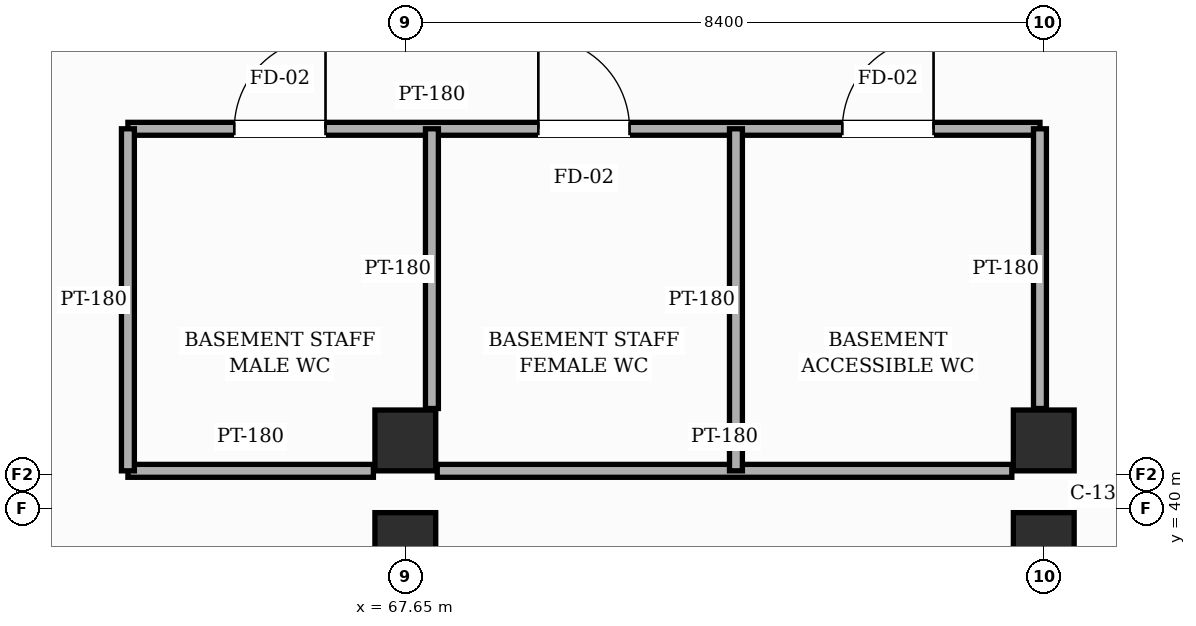
"""IFC4 building model, lengths in metres.
Left out: names, types, materials, properties, quantities, classifications, styles, units other than length and angle.
Written with IfcOpenShell. Run it as: python <this file> out.ifc"""

import sys

from ifc_helpers import new_model, si_unit, direction, frame, frame_2d, origin, origin_2d, place, context, subcontext, project, spatial, rectangle, hollow_rectangle, extrude, element, fill, save


model = new_model("IFC4")
c1 = context("Model", 3, precision=1e-05, world=origin(), true_north=direction((0.0, 1.0)))
c2 = subcontext(c1, "Body", "Model", "MODEL_VIEW")
j1 = project(units=[si_unit("LENGTHUNIT", "METRE"), si_unit("PLANEANGLEUNIT", "RADIAN")], contexts=[c1])
p1 = place(None, origin())
s1 = spatial("IfcSite", under=j1, at=p1, CompositionType="ELEMENT")
p2 = place(p1, origin())
s2 = spatial("IfcBuilding", under=s1, at=p2, CompositionType="ELEMENT")
p3 = place(p2, frame((0.0, 0.0, -5.4)))
s3 = spatial("IfcBuildingStorey", under=s2, at=p3, CompositionType="ELEMENT", Elevation=-5.4)
p4 = place(p3, frame((67.65, 39.55, 0.0), z_axis=(0.0, 0.0, 1.0), x_axis=(1.0, 0.0, 0.0)))
e1 = element("IfcColumn", 1, at=p4, inside=s3, PredefinedType="COLUMN", context=c2, shape_type="SweptSolid", body=[
    extrude(rectangle(XDim=0.8, YDim=0.8, at=origin_2d()), origin(), (0.0, 0.0, 1.0), 5.12),
])
p5 = place(p3, frame((67.65, 40.9, 0.0), z_axis=(0.0, 0.0, 1.0), x_axis=(1.0, 0.0, 0.0)))
e2 = element("IfcColumn", 2, at=p5, inside=s3, PredefinedType="COLUMN", context=c2, shape_type="SweptSolid", body=[
    extrude(hollow_rectangle(XDim=0.8, YDim=0.8, WallThickness=0.032, InnerFilletRadius=0.032, OuterFilletRadius=0.064, at=origin_2d()), origin(), (0.0, 0.0, 1.0), 5.4),
])
p6 = place(p3, frame((76.05, 39.55, 0.0), z_axis=(0.0, 0.0, 1.0), x_axis=(1.0, 0.0, 0.0)))
e3 = element("IfcColumn", 3, at=p6, inside=s3, PredefinedType="COLUMN", context=c2, shape_type="SweptSolid", body=[
    extrude(rectangle(XDim=0.8, YDim=0.8, at=origin_2d()), origin(), (0.0, 0.0, 1.0), 5.12),
])
p7 = place(p3, frame((76.05, 40.9, 0.0), z_axis=(0.0, 0.0, 1.0), x_axis=(1.0, 0.0, 0.0)))
e4 = element("IfcColumn", 4, at=p7, inside=s3, PredefinedType="COLUMN", context=c2, shape_type="SweptSolid", body=[
    extrude(hollow_rectangle(XDim=0.8, YDim=0.8, WallThickness=0.032, InnerFilletRadius=0.032, OuterFilletRadius=0.064, at=origin_2d()), origin(), (0.0, 0.0, 1.0), 5.4),
])
p8 = place(p3, frame((64.0, 40.5, 0.0), z_axis=(0.0, 0.0, 1.0), x_axis=(1.0, 0.0, 0.0)))
e5 = element("IfcWall", 5, at=p8, inside=s3, PredefinedType="PARTITIONING", context=c2, shape_type="SweptSolid", body=[
    extrude(rectangle(XDim=3.23, YDim=0.17, at=frame_2d((1.615, 0.0))), origin(), (0.0, 0.0, 1.0), 5.105),
])
p9 = place(p3, frame((68.07, 40.5, 0.0), z_axis=(0.0, 0.0, 1.0), x_axis=(1.0, 0.0, 0.0)))
e6 = element("IfcWall", 6, at=p9, inside=s3, PredefinedType="PARTITIONING", context=c2, shape_type="SweptSolid", body=[
    extrude(rectangle(XDim=7.56, YDim=0.17, at=frame_2d((3.78, 0.0))), origin(), (0.0, 0.0, 1.0), 5.105),
])
p10 = place(p3, frame((64.0, 45.0, 0.0), z_axis=(0.0, 0.0, 1.0), x_axis=(1.0, 0.0, 0.0)))
e7 = element("IfcWall", 7, at=p10, inside=s3, PredefinedType="PARTITIONING", context=c2, shape_type="SweptSolid", body=[
    extrude(rectangle(XDim=12.0, YDim=0.17, at=frame_2d((6.0, 0.0))), origin(), (0.0, 0.0, 1.0), 4.695),
])
p11 = place(p10, frame((1.4, 0.0, 0.0)))
e8 = element("IfcOpeningElement", 8, at=p11, cuts=e7, PredefinedType="OPENING", context=c2, shape_type="SweptSolid", body=[
    extrude(rectangle(XDim=1.2, YDim=2.2, at=frame_2d((0.6, 1.1))), frame((0.0, 0.095, 0.0), z_axis=(0.0, -1.0, 0.0), x_axis=(1.0, 0.0, 0.0)), (0.0, 0.0, 1.0), 0.19),
])
p12 = place(p10, frame((5.4, 0.0, 0.0)))
e9 = element("IfcOpeningElement", 9, at=p12, cuts=e7, PredefinedType="OPENING", context=c2, shape_type="SweptSolid", body=[
    extrude(rectangle(XDim=1.2, YDim=2.2, at=frame_2d((0.6, 1.1))), frame((0.0, 0.095, 0.0), z_axis=(0.0, -1.0, 0.0), x_axis=(1.0, 0.0, 0.0)), (0.0, 0.0, 1.0), 0.19),
])
p13 = place(p10, frame((9.4, 0.0, 0.0)))
e10 = element("IfcOpeningElement", 10, at=p13, cuts=e7, PredefinedType="OPENING", context=c2, shape_type="SweptSolid", body=[
    extrude(rectangle(XDim=1.2, YDim=2.2, at=frame_2d((0.6, 1.1))), frame((0.0, 0.095, 0.0), z_axis=(0.0, -1.0, 0.0), x_axis=(1.0, 0.0, 0.0)), (0.0, 0.0, 1.0), 0.19),
])
p14 = place(p3, frame((64.0, 40.5, 0.0), z_axis=(0.0, 0.0, 1.0), x_axis=(0.0, 1.0, 0.0)))
e11 = element("IfcWall", 11, at=p14, inside=s3, PredefinedType="PARTITIONING", context=c2, shape_type="SweptSolid", body=[
    extrude(rectangle(XDim=4.5, YDim=0.17, at=frame_2d((2.25, 0.0))), origin(), (0.0, 0.0, 1.0), 5.105),
])
p15 = place(p3, frame((68.0, 41.32, 0.0), z_axis=(0.0, 0.0, 1.0), x_axis=(0.0, 1.0, 0.0)))
e12 = element("IfcWall", 12, at=p15, inside=s3, PredefinedType="PARTITIONING", context=c2, shape_type="SweptSolid", body=[
    extrude(rectangle(XDim=3.68, YDim=0.17, at=frame_2d((1.84, 0.0))), origin(), (0.0, 0.0, 1.0), 4.345),
])
p16 = place(p3, frame((72.0, 40.5, 0.0), z_axis=(0.0, 0.0, 1.0), x_axis=(0.0, 1.0, 0.0)))
e13 = element("IfcWall", 13, at=p16, inside=s3, PredefinedType="PARTITIONING", context=c2, shape_type="SweptSolid", body=[
    extrude(rectangle(XDim=4.5, YDim=0.17, at=frame_2d((2.25, 0.0))), origin(), (0.0, 0.0, 1.0), 5.105),
])
p17 = place(p3, frame((76.0, 41.32, 0.0), z_axis=(0.0, 0.0, 1.0), x_axis=(0.0, 1.0, 0.0)))
e14 = element("IfcWall", 14, at=p17, inside=s3, PredefinedType="PARTITIONING", context=c2, shape_type="SweptSolid", body=[
    extrude(rectangle(XDim=3.68, YDim=0.17, at=frame_2d((1.84, 0.0))), origin(), (0.0, 0.0, 1.0), 4.345),
])
p18 = place(p11, origin())
e15 = element("IfcDoor", 15, at=p18, inside=s3, OperationType="SINGLE_SWING_RIGHT", PredefinedType="DOOR", context=c2, shape_type="SweptSolid", body=[
    extrude(rectangle(XDim=1.2, YDim=2.2, at=frame_2d((0.6, 1.1))), frame((0.0, 0.025, 0.0), z_axis=(0.0, -1.0, 0.0), x_axis=(1.0, 0.0, 0.0)), (0.0, 0.0, 1.0), 0.05),
])
fill(e8, e15)
p19 = place(p12, origin())
e16 = element("IfcDoor", 16, at=p19, inside=s3, OperationType="SINGLE_SWING_LEFT", PredefinedType="DOOR", context=c2, shape_type="SweptSolid", body=[
    extrude(rectangle(XDim=1.2, YDim=2.2, at=frame_2d((0.6, 1.1))), frame((0.0, 0.025, 0.0), z_axis=(0.0, -1.0, 0.0), x_axis=(1.0, 0.0, 0.0)), (0.0, 0.0, 1.0), 0.05),
])
fill(e9, e16)
p20 = place(p13, origin())
e17 = element("IfcDoor", 17, at=p20, inside=s3, OperationType="SINGLE_SWING_RIGHT", PredefinedType="DOOR", context=c2, shape_type="SweptSolid", body=[
    extrude(rectangle(XDim=1.2, YDim=2.2, at=frame_2d((0.6, 1.1))), frame((0.0, 0.025, 0.0), z_axis=(0.0, -1.0, 0.0), x_axis=(1.0, 0.0, 0.0)), (0.0, 0.0, 1.0), 0.05),
])
fill(e10, e17)
save(model, sys.argv[1])
